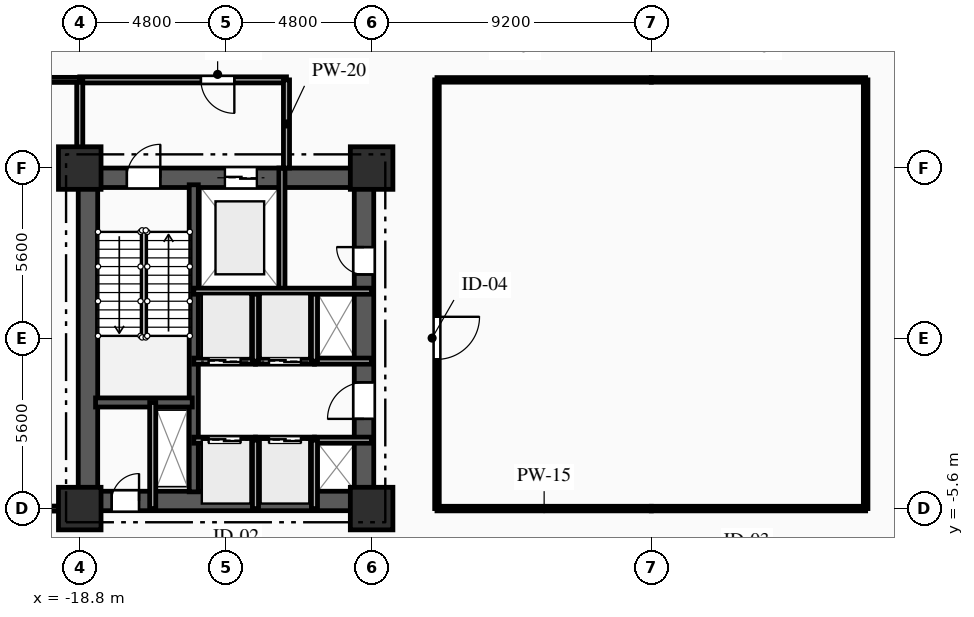
"""IFC4 building model, lengths in metres.
Left out: names, types, materials, properties, quantities, classifications, styles, units other than length and angle.
Written with IfcOpenShell. Run it as: python <this file> out.ifc"""

import sys

from ifc_helpers import new_model, si_unit, direction, frame, frame_2d, origin, origin_2d, place, context, subcontext, project, spatial, rectangle, extrude, element, fill, save


model = new_model("IFC4")
c1 = context("Model", 3, precision=1e-05, world=origin(), true_north=direction((0.0, 1.0)))
c2 = subcontext(c1, "Body", "Model", "MODEL_VIEW")
j1 = project(units=[si_unit("LENGTHUNIT", "METRE"), si_unit("PLANEANGLEUNIT", "RADIAN")], contexts=[c1])
p1 = place(None, origin())
s1 = spatial("IfcSite", under=j1, at=p1, CompositionType="ELEMENT")
p2 = place(p1, origin())
s2 = spatial("IfcBuilding", under=s1, at=p2, CompositionType="ELEMENT")
p3 = place(p2, frame((0.0, 0.0, 13.5)))
s3 = spatial("IfcBuildingStorey", under=s2, at=p3, CompositionType="ELEMENT", Elevation=13.5)
for number, where, z_axis, x_axis in (
    (1, (-18.8, -5.6, 0.0), (0.0, 0.0, 1.0), (1.0, 0.0, 0.0)),
    (2, (-18.8, 5.6, 0.0), (0.0, 0.0, 1.0), (1.0, 0.0, 0.0)),
    (3, (-9.2, -5.6, 0.0), (0.0, 0.0, 1.0), (1.0, 0.0, 0.0)),
    (4, (-9.2, 5.6, 0.0), (0.0, 0.0, 1.0), (1.0, 0.0, 0.0)),
):
    element("IfcColumn", number, at=place(p3, frame(where, z_axis=z_axis, x_axis=x_axis)), inside=s3, PredefinedType="COLUMN", context=c2, shape_type="SweptSolid", body=[
        extrude(rectangle(XDim=1.4, YDim=1.4, at=origin_2d()), origin(), (0.0, 0.0, 1.0), 4.5),
    ])
p4 = place(p3, frame((-18.8, 5.28, 0.0), z_axis=(0.0, 0.0, 1.0), x_axis=(1.0, 0.0, 0.0)))
e5 = element("IfcWall", 5, at=p4, inside=s3, PredefinedType="SHEAR", context=c2, shape_type="SweptSolid", body=[
    extrude(rectangle(XDim=9.6, YDim=0.64, at=frame_2d((4.8, 0.0))), origin(), (0.0, 0.0, 1.0), 4.17),
])
p5 = place(p4, frame((1.55, 0.0, 0.0)))
e6 = element("IfcOpeningElement", 6, at=p5, cuts=e5, PredefinedType="OPENING", context=c2, shape_type="SweptSolid", body=[
    extrude(rectangle(XDim=1.1, YDim=2.15, at=frame_2d((0.55, 1.075))), frame((0.0, 0.33, 0.0), z_axis=(0.0, -1.0, 0.0), x_axis=(1.0, 0.0, 0.0)), (0.0, 0.0, 1.0), 0.66),
])
p6 = place(p4, frame((4.775, 0.0, 0.0)))
e7 = element("IfcOpeningElement", 7, at=p6, cuts=e5, PredefinedType="OPENING", context=c2, shape_type="SweptSolid", body=[
    extrude(rectangle(XDim=1.05, YDim=2.1, at=frame_2d((0.525, 1.05))), frame((0.0, 0.33, 0.0), z_axis=(0.0, -1.0, 0.0), x_axis=(1.0, 0.0, 0.0)), (0.0, 0.0, 1.0), 0.66),
])
p7 = place(p3, frame((-18.8, -5.35, 0.0), z_axis=(0.0, 0.0, 1.0), x_axis=(1.0, 0.0, 0.0)))
e8 = element("IfcWall", 8, at=p7, inside=s3, PredefinedType="SHEAR", context=c2, shape_type="SweptSolid", body=[
    extrude(rectangle(XDim=9.6, YDim=0.64, at=frame_2d((4.8, 0.0))), origin(), (0.0, 0.0, 1.0), 4.17),
])
p8 = place(p7, frame((1.05, 0.0, 0.0)))
e9 = element("IfcOpeningElement", 9, at=p8, cuts=e8, PredefinedType="OPENING", context=c2, shape_type="SweptSolid", body=[
    extrude(rectangle(XDim=0.9, YDim=2.1, at=frame_2d((0.45, 1.05))), frame((0.0, 0.33, 0.0), z_axis=(0.0, -1.0, 0.0), x_axis=(1.0, 0.0, 0.0)), (0.0, 0.0, 1.0), 0.66),
])
p9 = place(p3, frame((-18.53, -5.05, 0.0), z_axis=(0.0, 0.0, 1.0), x_axis=(0.0, 1.0, 0.0)))
e10 = element("IfcWall", 10, at=p9, inside=s3, PredefinedType="SHEAR", context=c2, shape_type="SweptSolid", body=[
    extrude(rectangle(XDim=10.1, YDim=0.64, at=frame_2d((5.05, 0.0))), origin(), (0.0, 0.0, 1.0), 4.17),
])
p10 = place(p3, frame((-9.45, -5.05, 0.0), z_axis=(0.0, 0.0, 1.0), x_axis=(0.0, 1.0, 0.0)))
e11 = element("IfcWall", 11, at=p10, inside=s3, PredefinedType="SHEAR", context=c2, shape_type="SweptSolid", body=[
    extrude(rectangle(XDim=10.1, YDim=0.64, at=frame_2d((5.05, 0.0))), origin(), (0.0, 0.0, 1.0), 4.17),
])
p11 = place(p10, frame((7.15, 0.0, 0.0)))
e12 = element("IfcOpeningElement", 12, at=p11, cuts=e11, PredefinedType="OPENING", context=c2, shape_type="SweptSolid", body=[
    extrude(rectangle(XDim=0.9, YDim=2.1, at=frame_2d((0.45, 1.05))), frame((0.0, 0.33, 0.0), z_axis=(0.0, -1.0, 0.0), x_axis=(1.0, 0.0, 0.0)), (0.0, 0.0, 1.0), 0.66),
])
p12 = place(p10, frame((2.4, 0.0, 0.0)))
e13 = element("IfcOpeningElement", 13, at=p12, cuts=e11, PredefinedType="OPENING", context=c2, shape_type="SweptSolid", body=[
    extrude(rectangle(XDim=1.2, YDim=2.15, at=frame_2d((0.6, 1.075))), frame((0.0, 0.33, 0.0), z_axis=(0.0, -1.0, 0.0), x_axis=(1.0, 0.0, 0.0)), (0.0, 0.0, 1.0), 0.66),
])
p13 = place(p3, frame((-15.05, -5.05, 0.0), z_axis=(0.0, 0.0, 1.0), x_axis=(0.0, 1.0, 0.0)))
e14 = element("IfcWall", 14, at=p13, inside=s3, PredefinedType="SHEAR", context=c2, shape_type="SweptSolid", body=[
    extrude(rectangle(XDim=10.1, YDim=0.3, at=frame_2d((5.05, 0.0))), origin(), (0.0, 0.0, 1.0), 4.17),
])
p14 = place(p3, frame((-18.28, -2.11, 0.0), z_axis=(0.0, 0.0, 1.0), x_axis=(1.0, 0.0, 0.0)))
e15 = element("IfcWall", 15, at=p14, inside=s3, PredefinedType="SHEAR", context=c2, shape_type="SweptSolid", body=[
    extrude(rectangle(XDim=3.18, YDim=0.3, at=frame_2d((1.59, 0.0))), origin(), (0.0, 0.0, 1.0), 4.17),
])
p15 = place(p3, frame((-16.4, -5.6, 0.0), z_axis=(0.0, 0.0, 1.0), x_axis=(0.0, 1.0, 0.0)))
e16 = element("IfcWall", 16, at=p15, inside=s3, PredefinedType="PARTITIONING", context=c2, shape_type="SweptSolid", body=[
    extrude(rectangle(XDim=3.49, YDim=0.2, at=frame_2d((1.745, 0.0))), origin(), (0.0, 0.0, 1.0), 4.17),
])
p16 = place(p3, frame((-12.15, 1.55, 0.0), z_axis=(0.0, 0.0, 1.0), x_axis=(0.0, 1.0, 0.0)))
e17 = element("IfcWall", 17, at=p16, inside=s3, PredefinedType="PARTITIONING", context=c2, shape_type="SweptSolid", body=[
    extrude(rectangle(XDim=4.05, YDim=0.2, at=frame_2d((2.025, 0.0))), origin(), (0.0, 0.0, 1.0), 4.17),
])
p17 = place(p3, frame((-12.0, 8.5, 0.0), z_axis=(0.0, 0.0, 1.0), x_axis=(-1.0, 0.0, 0.0)))
e18 = element("IfcWall", 18, at=p17, inside=s3, PredefinedType="PARTITIONING", context=c2, shape_type="SweptSolid", body=[
    extrude(rectangle(XDim=6.8, YDim=0.2, at=frame_2d((3.4, 0.0))), origin(), (0.0, 0.0, 1.0), 4.17),
])
p18 = place(p17, frame((1.715, 0.0, 0.0)))
e19 = element("IfcOpeningElement", 19, at=p18, cuts=e18, PredefinedType="OPENING", context=c2, shape_type="SweptSolid", body=[
    extrude(rectangle(XDim=1.1, YDim=2.15, at=frame_2d((0.55, 1.075))), frame((0.0, 0.11, 0.0), z_axis=(0.0, -1.0, 0.0), x_axis=(1.0, 0.0, 0.0)), (0.0, 0.0, 1.0), 0.22),
])
p19 = place(p3, frame((-12.0, 5.6, 0.0), z_axis=(0.0, 0.0, 1.0), x_axis=(0.0, 1.0, 0.0)))
e20 = element("IfcWall", 20, at=p19, inside=s3, PredefinedType="PARTITIONING", context=c2, shape_type="SweptSolid", body=[
    extrude(rectangle(XDim=2.9, YDim=0.2, at=frame_2d((1.45, 0.0))), origin(), (0.0, 0.0, 1.0), 4.17),
])
p20 = place(p3, frame((-18.8, 8.5, 0.0), z_axis=(0.0, 0.0, 1.0), x_axis=(0.0, -1.0, 0.0)))
e21 = element("IfcWall", 21, at=p20, inside=s3, PredefinedType="PARTITIONING", context=c2, shape_type="SweptSolid", body=[
    extrude(rectangle(XDim=2.9, YDim=0.2, at=frame_2d((1.45, 0.0))), origin(), (0.0, 0.0, 1.0), 3.655),
])
p21 = place(p3, frame((-15.05, -3.35, 0.0), z_axis=(0.0, 0.0, 1.0), x_axis=(1.0, 0.0, 0.0)))
e22 = element("IfcWall", 22, at=p21, inside=s3, PredefinedType="PARTITIONING", context=c2, shape_type="SweptSolid", body=[
    extrude(rectangle(XDim=2.03, YDim=0.2, at=frame_2d((1.015, 0.0))), origin(), (0.0, 0.0, 1.0), 4.17),
])
p22 = place(p21, frame((0.49, 0.0, 0.0)))
e23 = element("IfcOpeningElement", 23, at=p22, cuts=e22, PredefinedType="OPENING", context=c2, shape_type="SweptSolid", body=[
    extrude(rectangle(XDim=1.05, YDim=2.1, at=frame_2d((0.525, 1.05))), frame((0.0, 0.11, 0.0), z_axis=(0.0, -1.0, 0.0), x_axis=(1.0, 0.0, 0.0)), (0.0, 0.0, 1.0), 0.22),
])
p23 = place(p3, frame((-13.02, -3.35, 0.0), z_axis=(0.0, 0.0, 1.0), x_axis=(1.0, 0.0, 0.0)))
e24 = element("IfcWall", 24, at=p23, inside=s3, PredefinedType="PARTITIONING", context=c2, shape_type="SweptSolid", body=[
    extrude(rectangle(XDim=1.94, YDim=0.2, at=frame_2d((0.97, 0.0))), origin(), (0.0, 0.0, 1.0), 4.17),
])
p24 = place(p23, frame((0.445, 0.0, 0.0)))
e25 = element("IfcOpeningElement", 25, at=p24, cuts=e24, PredefinedType="OPENING", context=c2, shape_type="SweptSolid", body=[
    extrude(rectangle(XDim=1.05, YDim=2.1, at=frame_2d((0.525, 1.05))), frame((0.0, 0.11, 0.0), z_axis=(0.0, -1.0, 0.0), x_axis=(1.0, 0.0, 0.0)), (0.0, 0.0, 1.0), 0.22),
])
p25 = place(p3, frame((-11.08, -3.35, 0.0), z_axis=(0.0, 0.0, 1.0), x_axis=(1.0, 0.0, 0.0)))
e26 = element("IfcWall", 26, at=p25, inside=s3, PredefinedType="PARTITIONING", context=c2, shape_type="SweptSolid", body=[
    extrude(rectangle(XDim=1.88, YDim=0.2, at=frame_2d((0.94, 0.0))), origin(), (0.0, 0.0, 1.0), 3.885),
])
p26 = place(p3, frame((-13.02, -0.75, 0.0), z_axis=(0.0, 0.0, 1.0), x_axis=(-1.0, 0.0, 0.0)))
e27 = element("IfcWall", 27, at=p26, inside=s3, PredefinedType="PARTITIONING", context=c2, shape_type="SweptSolid", body=[
    extrude(rectangle(XDim=2.03, YDim=0.2, at=frame_2d((1.015, 0.0))), origin(), (0.0, 0.0, 1.0), 4.17),
])
p27 = place(p26, frame((0.49, 0.0, 0.0)))
e28 = element("IfcOpeningElement", 28, at=p27, cuts=e27, PredefinedType="OPENING", context=c2, shape_type="SweptSolid", body=[
    extrude(rectangle(XDim=1.05, YDim=2.1, at=frame_2d((0.525, 1.05))), frame((0.0, 0.11, 0.0), z_axis=(0.0, -1.0, 0.0), x_axis=(1.0, 0.0, 0.0)), (0.0, 0.0, 1.0), 0.22),
])
p28 = place(p3, frame((-11.08, -0.75, 0.0), z_axis=(0.0, 0.0, 1.0), x_axis=(-1.0, 0.0, 0.0)))
e29 = element("IfcWall", 29, at=p28, inside=s3, PredefinedType="PARTITIONING", context=c2, shape_type="SweptSolid", body=[
    extrude(rectangle(XDim=1.94, YDim=0.2, at=frame_2d((0.97, 0.0))), origin(), (0.0, 0.0, 1.0), 4.17),
])
p29 = place(p28, frame((0.445, 0.0, 0.0)))
e30 = element("IfcOpeningElement", 30, at=p29, cuts=e29, PredefinedType="OPENING", context=c2, shape_type="SweptSolid", body=[
    extrude(rectangle(XDim=1.05, YDim=2.1, at=frame_2d((0.525, 1.05))), frame((0.0, 0.11, 0.0), z_axis=(0.0, -1.0, 0.0), x_axis=(1.0, 0.0, 0.0)), (0.0, 0.0, 1.0), 0.22),
])
p30 = place(p3, frame((-9.2, -0.75, 0.0), z_axis=(0.0, 0.0, 1.0), x_axis=(-1.0, 0.0, 0.0)))
e31 = element("IfcWall", 31, at=p30, inside=s3, PredefinedType="PARTITIONING", context=c2, shape_type="SweptSolid", body=[
    extrude(rectangle(XDim=1.88, YDim=0.2, at=frame_2d((0.94, 0.0))), origin(), (0.0, 0.0, 1.0), 4.17),
])
for number, where, z_axis, x_axis in (
    (32, (-13.02, -5.6, 0.0), (0.0, 0.0, 1.0), (0.0, 1.0, 0.0)),
    (33, (-11.08, -5.6, 0.0), (0.0, 0.0, 1.0), (0.0, 1.0, 0.0)),
):
    element("IfcWall", number, at=place(p3, frame(where, z_axis=z_axis, x_axis=x_axis)), inside=s3, PredefinedType="PARTITIONING", context=c2, shape_type="SweptSolid", body=[
        extrude(rectangle(XDim=2.25, YDim=0.2, at=frame_2d((1.125, 0.0))), origin(), (0.0, 0.0, 1.0), 4.17),
    ])
for number, where, z_axis, x_axis in (
    (34, (-13.02, -0.75, 0.0), (0.0, 0.0, 1.0), (0.0, 1.0, 0.0)),
    (35, (-11.08, -0.75, 0.0), (0.0, 0.0, 1.0), (0.0, 1.0, 0.0)),
):
    element("IfcWall", number, at=place(p3, frame(where, z_axis=z_axis, x_axis=x_axis)), inside=s3, PredefinedType="PARTITIONING", context=c2, shape_type="SweptSolid", body=[
        extrude(rectangle(XDim=2.3, YDim=0.2, at=frame_2d((1.15, 0.0))), origin(), (0.0, 0.0, 1.0), 4.17),
    ])
p31 = place(p3, frame((-18.8, 8.5, 0.0), z_axis=(0.0, 0.0, 1.0), x_axis=(-1.0, 0.0, 0.0)))
e36 = element("IfcWall", 36, at=p31, inside=s3, PredefinedType="PARTITIONING", context=c2, shape_type="SweptSolid", body=[
    extrude(rectangle(XDim=5.2, YDim=0.165, at=frame_2d((2.6, 0.0))), origin(), (0.0, 0.0, 1.0), 4.17),
])
p32 = place(p31, frame((2.89, 0.0, 0.0)))
e37 = element("IfcOpeningElement", 37, at=p32, cuts=e36, PredefinedType="OPENING", context=c2, shape_type="SweptSolid", body=[
    extrude(rectangle(XDim=1.4, YDim=2.3, at=frame_2d((0.7, 1.15))), frame((0.0, 0.093, 0.0), z_axis=(0.0, -1.0, 0.0), x_axis=(1.0, 0.0, 0.0)), (0.0, 0.0, 1.0), 0.185),
])
for number, where, z_axis, x_axis in (
    (38, (0.0, 8.5, 0.0), (0.0, 0.0, 1.0), (-1.0, 0.0, 0.0)),
    (39, (7.05, 8.5, 0.0), (0.0, 0.0, 1.0), (-1.0, 0.0, 0.0)),
):
    element("IfcWall", number, at=place(p3, frame(where, z_axis=z_axis, x_axis=x_axis)), inside=s3, PredefinedType="PARTITIONING", context=c2, shape_type="SweptSolid", body=[
        extrude(rectangle(XDim=7.05, YDim=0.15, at=frame_2d((3.525, 0.0))), origin(), (0.0, 0.0, 1.0), 4.17),
    ])
p33 = place(p3, frame((-24.0, -5.6, 0.0), z_axis=(0.0, 0.0, 1.0), x_axis=(1.0, 0.0, 0.0)))
e40 = element("IfcWall", 40, at=p33, inside=s3, PredefinedType="PARTITIONING", context=c2, shape_type="SweptSolid", body=[
    extrude(rectangle(XDim=5.2, YDim=0.165, at=frame_2d((2.6, 0.0))), origin(), (0.0, 0.0, 1.0), 4.17),
])
for number, where, z_axis, x_axis in (
    (41, (-7.05, -5.6, 0.0), (0.0, 0.0, 1.0), (1.0, 0.0, 0.0)),
    (42, (0.0, -5.6, 0.0), (0.0, 0.0, 1.0), (1.0, 0.0, 0.0)),
):
    element("IfcWall", number, at=place(p3, frame(where, z_axis=z_axis, x_axis=x_axis)), inside=s3, PredefinedType="PARTITIONING", context=c2, shape_type="SweptSolid", body=[
        extrude(rectangle(XDim=7.05, YDim=0.15, at=frame_2d((3.525, 0.0))), origin(), (0.0, 0.0, 1.0), 3.655),
    ])
p34 = place(p3, frame((-7.05, 8.5, 0.0), z_axis=(0.0, 0.0, 1.0), x_axis=(0.0, -1.0, 0.0)))
e43 = element("IfcWall", 43, at=p34, inside=s3, PredefinedType="PARTITIONING", context=c2, shape_type="SweptSolid", body=[
    extrude(rectangle(XDim=14.1, YDim=0.15, at=frame_2d((7.05, 0.0))), origin(), (0.0, 0.0, 1.0), 4.17),
])
p35 = place(p34, frame((7.792, 0.0, 0.0)))
e44 = element("IfcOpeningElement", 44, at=p35, cuts=e43, PredefinedType="OPENING", context=c2, shape_type="SweptSolid", body=[
    extrude(rectangle(XDim=1.4, YDim=2.3, at=frame_2d((0.7, 1.15))), frame((0.0, 0.085, 0.0), z_axis=(0.0, -1.0, 0.0), x_axis=(1.0, 0.0, 0.0)), (0.0, 0.0, 1.0), 0.17),
])
p36 = place(p3, frame((7.05, -5.6, 0.0), z_axis=(0.0, 0.0, 1.0), x_axis=(0.0, 1.0, 0.0)))
e45 = element("IfcWall", 45, at=p36, inside=s3, PredefinedType="PARTITIONING", context=c2, shape_type="SweptSolid", body=[
    extrude(rectangle(XDim=14.1, YDim=0.15, at=frame_2d((7.05, 0.0))), origin(), (0.0, 0.0, 1.0), 4.17),
])
p37 = place(p3, frame((-15.05, 1.55, 0.0), z_axis=(0.0, 0.0, 1.0), x_axis=(1.0, 0.0, 0.0)))
e46 = element("IfcWall", 46, at=p37, inside=s3, PredefinedType="PARTITIONING", context=c2, shape_type="SweptSolid", body=[
    extrude(rectangle(XDim=5.85, YDim=0.2, at=frame_2d((2.925, 0.0))), origin(), (0.0, 0.0, 1.0), 4.17),
])
p38 = place(p5, origin())
e47 = element("IfcDoor", 47, at=p38, inside=s3, OperationType="SINGLE_SWING_RIGHT", PredefinedType="DOOR", context=c2, shape_type="SweptSolid", body=[
    extrude(rectangle(XDim=1.1, YDim=2.15, at=frame_2d((0.55, 1.075))), frame((0.0, 0.025, 0.0), z_axis=(0.0, -1.0, 0.0), x_axis=(1.0, 0.0, 0.0)), (0.0, 0.0, 1.0), 0.05),
])
fill(e6, e47)
p39 = place(p6, origin())
e48 = element("IfcDoor", 48, at=p39, inside=s3, OperationType="DOUBLE_DOOR_SLIDING", PredefinedType="DOOR", context=c2, shape_type="SweptSolid", body=[
    extrude(rectangle(XDim=1.05, YDim=2.1, at=frame_2d((0.525, 1.05))), frame((0.0, 0.025, 0.0), z_axis=(0.0, -1.0, 0.0), x_axis=(1.0, 0.0, 0.0)), (0.0, 0.0, 1.0), 0.05),
])
fill(e7, e48)
p40 = place(p8, origin())
e49 = element("IfcDoor", 49, at=p40, inside=s3, OperationType="SINGLE_SWING_RIGHT", PredefinedType="DOOR", context=c2, shape_type="SweptSolid", body=[
    extrude(rectangle(XDim=0.9, YDim=2.1, at=frame_2d((0.45, 1.05))), frame((0.0, 0.025, 0.0), z_axis=(0.0, -1.0, 0.0), x_axis=(1.0, 0.0, 0.0)), (0.0, 0.0, 1.0), 0.05),
])
fill(e9, e49)
p41 = place(p18, origin())
e50 = element("IfcDoor", 50, at=p41, inside=s3, OperationType="SINGLE_SWING_LEFT", PredefinedType="DOOR", context=c2, shape_type="SweptSolid", body=[
    extrude(rectangle(XDim=1.1, YDim=2.15, at=frame_2d((0.55, 1.075))), frame((0.0, 0.025, 0.0), z_axis=(0.0, -1.0, 0.0), x_axis=(1.0, 0.0, 0.0)), (0.0, 0.0, 1.0), 0.05),
])
fill(e19, e50)
p42 = place(p11, origin())
e51 = element("IfcDoor", 51, at=p42, inside=s3, OperationType="SINGLE_SWING_RIGHT", PredefinedType="DOOR", context=c2, shape_type="SweptSolid", body=[
    extrude(rectangle(XDim=0.9, YDim=2.1, at=frame_2d((0.45, 1.05))), frame((0.0, 0.025, 0.0), z_axis=(0.0, -1.0, 0.0), x_axis=(1.0, 0.0, 0.0)), (0.0, 0.0, 1.0), 0.05),
])
fill(e12, e51)
p43 = place(p22, origin())
e52 = element("IfcDoor", 52, at=p43, inside=s3, OperationType="DOUBLE_DOOR_SLIDING", PredefinedType="DOOR", context=c2, shape_type="SweptSolid", body=[
    extrude(rectangle(XDim=1.05, YDim=2.1, at=frame_2d((0.525, 1.05))), frame((0.0, 0.025, 0.0), z_axis=(0.0, -1.0, 0.0), x_axis=(1.0, 0.0, 0.0)), (0.0, 0.0, 1.0), 0.05),
])
fill(e23, e52)
p44 = place(p24, origin())
e53 = element("IfcDoor", 53, at=p44, inside=s3, OperationType="DOUBLE_DOOR_SLIDING", PredefinedType="DOOR", context=c2, shape_type="SweptSolid", body=[
    extrude(rectangle(XDim=1.05, YDim=2.1, at=frame_2d((0.525, 1.05))), frame((0.0, 0.025, 0.0), z_axis=(0.0, -1.0, 0.0), x_axis=(1.0, 0.0, 0.0)), (0.0, 0.0, 1.0), 0.05),
])
fill(e25, e53)
p45 = place(p27, origin())
e54 = element("IfcDoor", 54, at=p45, inside=s3, OperationType="DOUBLE_DOOR_SLIDING", PredefinedType="DOOR", context=c2, shape_type="SweptSolid", body=[
    extrude(rectangle(XDim=1.05, YDim=2.1, at=frame_2d((0.525, 1.05))), frame((0.0, 0.025, 0.0), z_axis=(0.0, -1.0, 0.0), x_axis=(1.0, 0.0, 0.0)), (0.0, 0.0, 1.0), 0.05),
])
fill(e28, e54)
p46 = place(p29, origin())
e55 = element("IfcDoor", 55, at=p46, inside=s3, OperationType="DOUBLE_DOOR_SLIDING", PredefinedType="DOOR", context=c2, shape_type="SweptSolid", body=[
    extrude(rectangle(XDim=1.05, YDim=2.1, at=frame_2d((0.525, 1.05))), frame((0.0, 0.025, 0.0), z_axis=(0.0, -1.0, 0.0), x_axis=(1.0, 0.0, 0.0)), (0.0, 0.0, 1.0), 0.05),
])
fill(e30, e55)
p47 = place(p12, origin())
e56 = element("IfcDoor", 56, at=p47, inside=s3, OperationType="SINGLE_SWING_LEFT", PredefinedType="DOOR", context=c2, shape_type="SweptSolid", body=[
    extrude(rectangle(XDim=1.2, YDim=2.15, at=frame_2d((0.6, 1.075))), frame((0.0, 0.025, 0.0), z_axis=(0.0, -1.0, 0.0), x_axis=(1.0, 0.0, 0.0)), (0.0, 0.0, 1.0), 0.05),
])
fill(e13, e56)
p48 = place(p35, origin())
e57 = element("IfcDoor", 57, at=p48, inside=s3, OperationType="SINGLE_SWING_LEFT", PredefinedType="DOOR", context=c2, shape_type="SweptSolid", body=[
    extrude(rectangle(XDim=1.4, YDim=2.3, at=frame_2d((0.7, 1.15))), frame((0.0, 0.025, 0.0), z_axis=(0.0, -1.0, 0.0), x_axis=(1.0, 0.0, 0.0)), (0.0, 0.0, 1.0), 0.05),
])
fill(e44, e57)
save(model, sys.argv[1])
